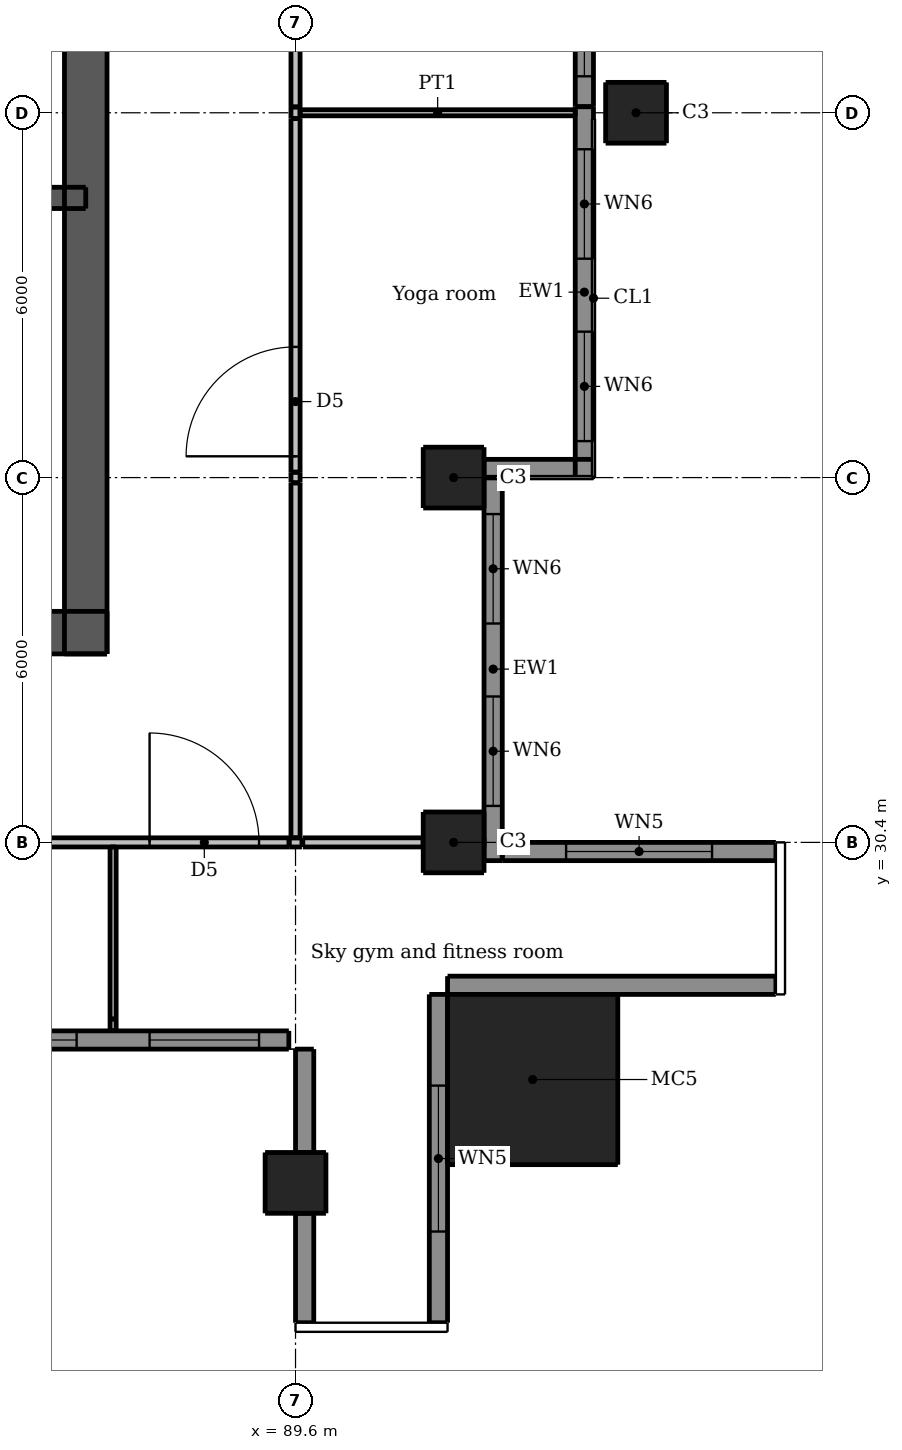
"""IFC4 building model, lengths in metres.
Left out: names, types, materials, properties, quantities, classifications, styles, units other than length and angle.
Written with IfcOpenShell. Run it as: python <this file> out.ifc"""

import sys

from ifc_helpers import new_model, si_unit, direction, frame, frame_2d, origin, origin_2d, place, context, subcontext, project, spatial, rectangle, extrude, element, fill, save


model = new_model("IFC4")
c1 = context("Model", 3, precision=1e-05, world=origin(), true_north=direction((0.0, 1.0)))
c2 = subcontext(c1, "Body", "Model", "MODEL_VIEW")
j1 = project(units=[si_unit("LENGTHUNIT", "METRE"), si_unit("PLANEANGLEUNIT", "RADIAN")], contexts=[c1])
p1 = place(None, origin())
s1 = spatial("IfcSite", under=j1, at=p1, CompositionType="ELEMENT")
p2 = place(p1, origin())
s2 = spatial("IfcBuilding", under=s1, at=p2, CompositionType="ELEMENT")
p3 = place(p2, frame((0.0, 0.0, 150.4)))
s3 = spatial("IfcBuildingStorey", under=s2, at=p3, CompositionType="ELEMENT", Elevation=150.4)
p4 = place(p3, frame((62.5, 33.85, 0.0), z_axis=(0.0, 0.0, 1.0), x_axis=(1.0, 0.0, 0.0)))
e1 = element("IfcWall", 1, at=p4, inside=s3, PredefinedType="SHEAR", context=c2, shape_type="SweptSolid", body=[
    extrude(rectangle(XDim=24.0, YDim=0.7, at=frame_2d((12.0, 0.0))), origin(), (0.0, 0.0, 1.0), 4.25),
])
p5 = place(p4, frame((1.962, 0.0, 0.0)))
e2 = element("IfcOpeningElement", 2, at=p5, cuts=e1, PredefinedType="OPENING", context=c2, shape_type="SweptSolid", body=[
    extrude(rectangle(XDim=1.1, YDim=2.1, at=frame_2d((0.55, 1.05))), frame((0.0, 0.36, 0.0), z_axis=(0.0, -1.0, 0.0), x_axis=(1.0, 0.0, 0.0)), (0.0, 0.0, 1.0), 0.72),
])
p6 = place(p4, frame((20.938, 0.0, 0.0)))
e3 = element("IfcOpeningElement", 3, at=p6, cuts=e1, PredefinedType="OPENING", context=c2, shape_type="SweptSolid", body=[
    extrude(rectangle(XDim=1.1, YDim=2.1, at=frame_2d((0.55, 1.05))), frame((0.0, 0.36, 0.0), z_axis=(0.0, -1.0, 0.0), x_axis=(1.0, 0.0, 0.0)), (0.0, 0.0, 1.0), 0.72),
])
p7 = place(p4, frame((8.0, 0.0, 0.0)))
e4 = element("IfcOpeningElement", 4, at=p7, cuts=e1, PredefinedType="OPENING", context=c2, shape_type="SweptSolid", body=[
    extrude(rectangle(XDim=1.1, YDim=2.1, at=frame_2d((0.55, 1.05))), frame((0.0, 0.36, 0.0), z_axis=(0.0, -1.0, 0.0), x_axis=(1.0, 0.0, 0.0)), (0.0, 0.0, 1.0), 0.72),
])
p8 = place(p4, frame((17.5, 0.0, 0.0)))
e5 = element("IfcOpeningElement", 5, at=p8, cuts=e1, PredefinedType="OPENING", context=c2, shape_type="SweptSolid", body=[
    extrude(rectangle(XDim=0.9, YDim=2.1, at=frame_2d((0.45, 1.05))), frame((0.0, 0.36, 0.0), z_axis=(0.0, -1.0, 0.0), x_axis=(1.0, 0.0, 0.0)), (0.0, 0.0, 1.0), 0.72),
])
p9 = place(p3, frame((86.15, 33.5, 0.0), z_axis=(0.0, 0.0, 1.0), x_axis=(0.0, 1.0, 0.0)))
e6 = element("IfcWall", 6, at=p9, inside=s3, PredefinedType="SHEAR", context=c2, shape_type="SweptSolid", body=[
    extrude(rectangle(XDim=24.0, YDim=0.7, at=frame_2d((12.0, 0.0))), origin(), (0.0, 0.0, 1.0), 4.25),
])
p10 = place(p9, frame((11.2, 0.0, 0.0)))
e7 = element("IfcOpeningElement", 7, at=p10, cuts=e6, PredefinedType="OPENING", context=c2, shape_type="SweptSolid", body=[
    extrude(rectangle(XDim=1.6, YDim=2.1, at=frame_2d((0.8, 1.05))), frame((0.0, 0.36, 0.0), z_axis=(0.0, -1.0, 0.0), x_axis=(1.0, 0.0, 0.0)), (0.0, 0.0, 1.0), 0.72),
])
p11 = place(p3, frame((62.85, 41.0, 0.0), z_axis=(0.0, 0.0, 1.0), x_axis=(1.0, 0.0, 0.0)))
e8 = element("IfcWall", 8, at=p11, inside=s3, PredefinedType="SHEAR", context=c2, shape_type="SweptSolid", body=[
    extrude(rectangle(XDim=23.3, YDim=0.35, at=frame_2d((11.65, 0.0))), origin(), (0.0, 0.0, 1.0), 4.25),
])
for number, where, z_axis, x_axis in (
    (9, (89.6, 24.8, 0.0), (0.0, 0.0, 1.0), (1.0, 0.0, 0.0)),
    (10, (92.2, 30.4, 0.0), (0.0, 0.0, 1.0), (1.0, 0.0, 0.0)),
    (11, (92.2, 36.4, 0.0), (0.0, 0.0, 1.0), (1.0, 0.0, 0.0)),
    (12, (95.2, 42.4, 0.0), (0.0, 0.0, 1.0), (1.0, 0.0, 0.0)),
):
    element("IfcColumn", number, at=place(p3, frame(where, z_axis=z_axis, x_axis=x_axis)), inside=s3, PredefinedType="COLUMN", context=c2, shape_type="SweptSolid", body=[
        extrude(rectangle(XDim=1.0, YDim=1.0, at=origin_2d()), origin(), (0.0, 0.0, 1.0), 4.25),
    ])
p12 = place(p3, frame((93.5, 26.5, 0.0), z_axis=(0.0, 0.0, 1.0), x_axis=(1.0, 0.0, 0.0)))
e13 = element("IfcColumn", 13, at=p12, inside=s3, PredefinedType="COLUMN", context=c2, shape_type="SweptSolid", body=[
    extrude(rectangle(XDim=2.8, YDim=2.8, at=origin_2d()), origin(), (0.0, 0.0, 1.0), 4.5),
])
p13 = place(p3, frame((89.75, 27.0, 0.0), z_axis=(0.0, 0.0, 1.0), x_axis=(0.0, -1.0, 0.0)))
e14 = element("IfcWall", 14, at=p13, inside=s3, PredefinedType="SOLIDWALL", context=c2, shape_type="SweptSolid", body=[
    extrude(rectangle(XDim=1.7, YDim=0.3, at=frame_2d((0.85, 0.0))), origin(), (0.0, 0.0, 1.0), 4.25),
])
p14 = place(p3, frame((89.75, 24.3, 0.0), z_axis=(0.0, 0.0, 1.0), x_axis=(0.0, -1.0, 0.0)))
e15 = element("IfcWall", 15, at=p14, inside=s3, PredefinedType="SOLIDWALL", context=c2, shape_type="SweptSolid", body=[
    extrude(rectangle(XDim=1.8, YDim=0.3, at=frame_2d((0.9, 0.0))), origin(), (0.0, 0.0, 1.0), 4.25),
])
p15 = place(p3, frame((91.95, 22.5, 0.0), z_axis=(0.0, 0.0, 1.0), x_axis=(0.0, 1.0, 0.0)))
e16 = element("IfcWall", 16, at=p15, inside=s3, PredefinedType="SOLIDWALL", context=c2, shape_type="SweptSolid", body=[
    extrude(rectangle(XDim=5.4, YDim=0.3, at=frame_2d((2.7, 0.0))), origin(), (0.0, 0.0, 1.0), 4.25),
])
p16 = place(p15, frame((1.5, 0.0, 0.15)))
e17 = element("IfcOpeningElement", 17, at=p16, cuts=e16, PredefinedType="OPENING", context=c2, shape_type="SweptSolid", body=[
    extrude(rectangle(XDim=2.4, YDim=2.1, at=frame_2d((1.2, 1.05))), frame((0.0, 0.16, 0.0), z_axis=(0.0, -1.0, 0.0), x_axis=(1.0, 0.0, 0.0)), (0.0, 0.0, 1.0), 0.32),
])
p17 = place(p3, frame((92.1, 28.05, 0.0), z_axis=(0.0, 0.0, 1.0), x_axis=(1.0, 0.0, 0.0)))
e18 = element("IfcWall", 18, at=p17, inside=s3, PredefinedType="SOLIDWALL", context=c2, shape_type="SweptSolid", body=[
    extrude(rectangle(XDim=5.4, YDim=0.3, at=frame_2d((2.7, 0.0))), origin(), (0.0, 0.0, 1.0), 4.25),
])
p18 = place(p3, frame((97.5, 30.25, 0.0), z_axis=(0.0, 0.0, 1.0), x_axis=(-1.0, 0.0, 0.0)))
e19 = element("IfcWall", 19, at=p18, inside=s3, PredefinedType="SOLIDWALL", context=c2, shape_type="SweptSolid", body=[
    extrude(rectangle(XDim=4.5, YDim=0.3, at=frame_2d((2.25, 0.0))), origin(), (0.0, 0.0, 1.0), 4.25),
])
p19 = place(p18, frame((1.05, 0.0, 0.15)))
e20 = element("IfcOpeningElement", 20, at=p19, cuts=e19, PredefinedType="OPENING", context=c2, shape_type="SweptSolid", body=[
    extrude(rectangle(XDim=2.4, YDim=2.1, at=frame_2d((1.2, 1.05))), frame((0.0, 0.16, 0.0), z_axis=(0.0, -1.0, 0.0), x_axis=(1.0, 0.0, 0.0)), (0.0, 0.0, 1.0), 0.32),
])
p20 = place(p3, frame((83.7, 27.15, 0.0), z_axis=(0.0, 0.0, 1.0), x_axis=(1.0, 0.0, 0.0)))
e21 = element("IfcWall", 21, at=p20, inside=s3, PredefinedType="SOLIDWALL", context=c2, shape_type="SweptSolid", body=[
    extrude(rectangle(XDim=5.79, YDim=0.3, at=frame_2d((2.895, 0.0))), origin(), (0.0, 0.0, 1.0), 4.25),
])
p21 = place(p20, frame((0.5, 0.0, 0.15)))
e22 = element("IfcOpeningElement", 22, at=p21, cuts=e21, PredefinedType="OPENING", context=c2, shape_type="SweptSolid", body=[
    extrude(rectangle(XDim=1.8, YDim=2.1, at=frame_2d((0.9, 1.05))), frame((0.0, 0.16, 0.0), z_axis=(0.0, -1.0, 0.0), x_axis=(1.0, 0.0, 0.0)), (0.0, 0.0, 1.0), 0.32),
])
p22 = place(p20, frame((3.5, 0.0, 0.15)))
e23 = element("IfcOpeningElement", 23, at=p22, cuts=e21, PredefinedType="OPENING", context=c2, shape_type="SweptSolid", body=[
    extrude(rectangle(XDim=1.8, YDim=2.1, at=frame_2d((0.9, 1.05))), frame((0.0, 0.16, 0.0), z_axis=(0.0, -1.0, 0.0), x_axis=(1.0, 0.0, 0.0)), (0.0, 0.0, 1.0), 0.32),
])
p23 = place(p3, frame((92.85, 30.1, 0.0), z_axis=(0.0, 0.0, 1.0), x_axis=(0.0, 1.0, 0.0)))
e24 = element("IfcWall", 24, at=p23, inside=s3, PredefinedType="SOLIDWALL", context=c2, shape_type="SweptSolid", body=[
    extrude(rectangle(XDim=6.3, YDim=0.3, at=frame_2d((3.15, 0.0))), origin(), (0.0, 0.0, 1.0), 4.25),
])
p24 = place(p23, frame((0.9, 0.0, 0.15)))
e25 = element("IfcOpeningElement", 25, at=p24, cuts=e24, PredefinedType="OPENING", context=c2, shape_type="SweptSolid", body=[
    extrude(rectangle(XDim=1.8, YDim=2.1, at=frame_2d((0.9, 1.05))), frame((0.0, 0.16, 0.0), z_axis=(0.0, -1.0, 0.0), x_axis=(1.0, 0.0, 0.0)), (0.0, 0.0, 1.0), 0.32),
])
p25 = place(p23, frame((3.9, 0.0, 0.15)))
e26 = element("IfcOpeningElement", 26, at=p25, cuts=e24, PredefinedType="OPENING", context=c2, shape_type="SweptSolid", body=[
    extrude(rectangle(XDim=1.8, YDim=2.1, at=frame_2d((0.9, 1.05))), frame((0.0, 0.16, 0.0), z_axis=(0.0, -1.0, 0.0), x_axis=(1.0, 0.0, 0.0)), (0.0, 0.0, 1.0), 0.32),
])
p26 = place(p3, frame((92.7, 36.55, 0.0), z_axis=(0.0, 0.0, 1.0), x_axis=(1.0, 0.0, 0.0)))
e27 = element("IfcWall", 27, at=p26, inside=s3, PredefinedType="SOLIDWALL", context=c2, shape_type="SweptSolid", body=[
    extrude(rectangle(XDim=1.8, YDim=0.3, at=frame_2d((0.9, 0.0))), origin(), (0.0, 0.0, 1.0), 3.795),
])
p27 = place(p3, frame((94.35, 36.4, 0.0), z_axis=(0.0, 0.0, 1.0), x_axis=(0.0, 1.0, 0.0)))
e28 = element("IfcWall", 28, at=p27, inside=s3, PredefinedType="SOLIDWALL", context=c2, shape_type="SweptSolid", body=[
    extrude(rectangle(XDim=6.1, YDim=0.3, at=frame_2d((3.05, 0.0))), origin(), (0.0, 0.0, 1.0), 4.25),
])
p28 = place(p27, frame((0.6, 0.0, 0.15)))
e29 = element("IfcOpeningElement", 29, at=p28, cuts=e28, PredefinedType="OPENING", context=c2, shape_type="SweptSolid", body=[
    extrude(rectangle(XDim=1.8, YDim=2.1, at=frame_2d((0.9, 1.05))), frame((0.0, 0.16, 0.0), z_axis=(0.0, -1.0, 0.0), x_axis=(1.0, 0.0, 0.0)), (0.0, 0.0, 1.0), 0.32),
])
p29 = place(p27, frame((3.6, 0.0, 0.15)))
e30 = element("IfcOpeningElement", 30, at=p29, cuts=e28, PredefinedType="OPENING", context=c2, shape_type="SweptSolid", body=[
    extrude(rectangle(XDim=1.8, YDim=2.1, at=frame_2d((0.9, 1.05))), frame((0.0, 0.16, 0.0), z_axis=(0.0, -1.0, 0.0), x_axis=(1.0, 0.0, 0.0)), (0.0, 0.0, 1.0), 0.32),
])
p30 = place(p3, frame((94.35, 42.5, 0.0), z_axis=(0.0, 0.0, 1.0), x_axis=(0.0, 1.0, 0.0)))
e31 = element("IfcWall", 31, at=p30, inside=s3, PredefinedType="SOLIDWALL", context=c2, shape_type="SweptSolid", body=[
    extrude(rectangle(XDim=5.8, YDim=0.3, at=frame_2d((2.9, 0.0))), origin(), (0.0, 0.0, 1.0), 4.25),
])
p31 = place(p30, frame((0.5, 0.0, 0.15)))
e32 = element("IfcOpeningElement", 32, at=p31, cuts=e31, PredefinedType="OPENING", context=c2, shape_type="SweptSolid", body=[
    extrude(rectangle(XDim=1.8, YDim=2.1, at=frame_2d((0.9, 1.05))), frame((0.0, 0.16, 0.0), z_axis=(0.0, -1.0, 0.0), x_axis=(1.0, 0.0, 0.0)), (0.0, 0.0, 1.0), 0.32),
])
p32 = place(p30, frame((3.5, 0.0, 0.15)))
e33 = element("IfcOpeningElement", 33, at=p32, cuts=e31, PredefinedType="OPENING", context=c2, shape_type="SweptSolid", body=[
    extrude(rectangle(XDim=1.8, YDim=2.1, at=frame_2d((0.9, 1.05))), frame((0.0, 0.16, 0.0), z_axis=(0.0, -1.0, 0.0), x_axis=(1.0, 0.0, 0.0)), (0.0, 0.0, 1.0), 0.32),
])
p33 = place(p3, frame((83.696, 30.4, 0.0), z_axis=(0.0, 0.0, 1.0), x_axis=(1.0, 0.0, 0.0)))
e34 = element("IfcWall", 34, at=p33, inside=s3, PredefinedType="PARTITIONING", context=c2, shape_type="SweptSolid", body=[
    extrude(rectangle(XDim=5.799, YDim=0.15, at=frame_2d((2.899, 0.0))), origin(), (0.0, 0.0, 1.0), 4.25),
])
p34 = place(p33, frame((3.504, 0.0, 0.0)))
e35 = element("IfcOpeningElement", 35, at=p34, cuts=e34, PredefinedType="OPENING", context=c2, shape_type="SweptSolid", body=[
    extrude(rectangle(XDim=1.8, YDim=2.1, at=frame_2d((0.9, 1.05))), frame((0.0, 0.085, 0.0), z_axis=(0.0, -1.0, 0.0), x_axis=(1.0, 0.0, 0.0)), (0.0, 0.0, 1.0), 0.17),
])
p35 = place(p3, frame((89.495, 30.4, 0.0), z_axis=(0.0, 0.0, 1.0), x_axis=(1.0, 0.0, 0.0)))
e36 = element("IfcWall", 36, at=p35, inside=s3, PredefinedType="PARTITIONING", context=c2, shape_type="SweptSolid", body=[
    extrude(rectangle(XDim=0.211, YDim=0.15, at=frame_2d((0.105, 0.0))), origin(), (0.0, 0.0, 1.0), 3.711),
])
p36 = place(p3, frame((89.72, 30.4, 0.0), z_axis=(0.0, 0.0, 1.0), x_axis=(1.0, 0.0, 0.0)))
e37 = element("IfcWall", 37, at=p36, inside=s3, PredefinedType="PARTITIONING", context=c2, shape_type="SweptSolid", body=[
    extrude(rectangle(XDim=1.98, YDim=0.15, at=frame_2d((0.99, 0.0))), origin(), (0.0, 0.0, 1.0), 3.899),
])
p37 = place(p3, frame((91.7, 30.4, 0.0), z_axis=(0.0, 0.0, 1.0), x_axis=(1.0, 0.0, 0.0)))
e38 = element("IfcWall", 38, at=p37, inside=s3, PredefinedType="PARTITIONING", context=c2, shape_type="SweptSolid", body=[
    extrude(rectangle(XDim=1.0, YDim=0.15, at=frame_2d((0.5, 0.0))), origin(), (0.0, 0.0, 1.0), 4.25),
])
p38 = place(p3, frame((89.675, 42.4, 0.0), z_axis=(0.0, 0.0, 1.0), x_axis=(1.0, 0.0, 0.0)))
e39 = element("IfcWall", 39, at=p38, inside=s3, PredefinedType="PARTITIONING", context=c2, shape_type="SweptSolid", body=[
    extrude(rectangle(XDim=4.525, YDim=0.1, at=frame_2d((2.262, 0.0))), origin(), (0.0, 0.0, 1.0), 3.79),
])
p39 = place(p3, frame((86.6, 27.305, 0.0), z_axis=(0.0, 0.0, 1.0), x_axis=(0.0, 1.0, 0.0)))
e40 = element("IfcWall", 40, at=p39, inside=s3, PredefinedType="PARTITIONING", context=c2, shape_type="SweptSolid", body=[
    extrude(rectangle(XDim=0.19, YDim=0.1, at=frame_2d((0.095, 0.0))), origin(), (0.0, 0.0, 1.0), 3.797),
])
p40 = place(p3, frame((86.6, 27.495, 0.0), z_axis=(0.0, 0.0, 1.0), x_axis=(0.0, 1.0, 0.0)))
e41 = element("IfcWall", 41, at=p40, inside=s3, PredefinedType="PARTITIONING", context=c2, shape_type="SweptSolid", body=[
    extrude(rectangle(XDim=2.83, YDim=0.1, at=frame_2d((1.415, 0.0))), origin(), (0.0, 0.0, 1.0), 4.25),
])
p41 = place(p3, frame((89.6, 30.475, 0.0), z_axis=(0.0, 0.0, 1.0), x_axis=(0.0, 1.0, 0.0)))
e42 = element("IfcWall", 42, at=p41, inside=s3, PredefinedType="PARTITIONING", context=c2, shape_type="SweptSolid", body=[
    extrude(rectangle(XDim=5.836, YDim=0.15, at=frame_2d((2.918, 0.0))), origin(), (0.0, 0.0, 1.0), 3.711),
])
p42 = place(p3, frame((89.6, 36.316, 0.0), z_axis=(0.0, 0.0, 1.0), x_axis=(0.0, 1.0, 0.0)))
e43 = element("IfcWall", 43, at=p42, inside=s3, PredefinedType="PARTITIONING", context=c2, shape_type="SweptSolid", body=[
    extrude(rectangle(XDim=0.173, YDim=0.15, at=frame_2d((0.086, 0.0))), origin(), (0.0, 0.0, 1.0), 3.847),
])
p43 = place(p3, frame((89.6, 36.489, 0.0), z_axis=(0.0, 0.0, 1.0), x_axis=(0.0, 1.0, 0.0)))
e44 = element("IfcWall", 44, at=p43, inside=s3, PredefinedType="PARTITIONING", context=c2, shape_type="SweptSolid", body=[
    extrude(rectangle(XDim=5.815, YDim=0.15, at=frame_2d((2.908, 0.0))), origin(), (0.0, 0.0, 1.0), 4.25),
])
p44 = place(p43, frame((0.261, 0.0, 0.0)))
e45 = element("IfcOpeningElement", 45, at=p44, cuts=e44, PredefinedType="OPENING", context=c2, shape_type="SweptSolid", body=[
    extrude(rectangle(XDim=1.8, YDim=2.1, at=frame_2d((0.9, 1.05))), frame((0.0, 0.085, 0.0), z_axis=(0.0, -1.0, 0.0), x_axis=(1.0, 0.0, 0.0)), (0.0, 0.0, 1.0), 0.17),
])
p45 = place(p3, frame((89.6, 42.304, 0.0), z_axis=(0.0, 0.0, 1.0), x_axis=(0.0, 1.0, 0.0)))
e46 = element("IfcWall", 46, at=p45, inside=s3, PredefinedType="PARTITIONING", context=c2, shape_type="SweptSolid", body=[
    extrude(rectangle(XDim=0.191, YDim=0.15, at=frame_2d((0.096, 0.0))), origin(), (0.0, 0.0, 1.0), 3.79),
])
p46 = place(p3, frame((89.6, 42.496, 0.0), z_axis=(0.0, 0.0, 1.0), x_axis=(0.0, 1.0, 0.0)))
e47 = element("IfcWall", 47, at=p46, inside=s3, PredefinedType="PARTITIONING", context=c2, shape_type="SweptSolid", body=[
    extrude(rectangle(XDim=5.809, YDim=0.15, at=frame_2d((2.904, 0.0))), origin(), (0.0, 0.0, 1.0), 4.25),
])
p47 = place(p16, origin())
e48 = element("IfcWindow", 48, at=p47, inside=s3, PartitioningType="DOUBLE_PANEL_VERTICAL", PredefinedType="WINDOW", context=c2, shape_type="SweptSolid", body=[
    extrude(rectangle(XDim=2.4, YDim=2.1, at=frame_2d((1.2, 1.05))), frame((0.0, 0.03, 0.0), z_axis=(0.0, -1.0, 0.0), x_axis=(1.0, 0.0, 0.0)), (0.0, 0.0, 1.0), 0.06),
])
fill(e17, e48)
p48 = place(p19, origin())
e49 = element("IfcWindow", 49, at=p48, inside=s3, PartitioningType="DOUBLE_PANEL_VERTICAL", PredefinedType="WINDOW", context=c2, shape_type="SweptSolid", body=[
    extrude(rectangle(XDim=2.4, YDim=2.1, at=frame_2d((1.2, 1.05))), frame((0.0, 0.03, 0.0), z_axis=(0.0, -1.0, 0.0), x_axis=(1.0, 0.0, 0.0)), (0.0, 0.0, 1.0), 0.06),
])
fill(e20, e49)
p49 = place(p21, origin())
e50 = element("IfcWindow", 50, at=p49, inside=s3, PartitioningType="DOUBLE_PANEL_VERTICAL", PredefinedType="WINDOW", context=c2, shape_type="SweptSolid", body=[
    extrude(rectangle(XDim=1.8, YDim=2.1, at=frame_2d((0.9, 1.05))), frame((0.0, 0.03, 0.0), z_axis=(0.0, -1.0, 0.0), x_axis=(1.0, 0.0, 0.0)), (0.0, 0.0, 1.0), 0.06),
])
fill(e22, e50)
p50 = place(p22, origin())
e51 = element("IfcWindow", 51, at=p50, inside=s3, PartitioningType="DOUBLE_PANEL_VERTICAL", PredefinedType="WINDOW", context=c2, shape_type="SweptSolid", body=[
    extrude(rectangle(XDim=1.8, YDim=2.1, at=frame_2d((0.9, 1.05))), frame((0.0, 0.03, 0.0), z_axis=(0.0, -1.0, 0.0), x_axis=(1.0, 0.0, 0.0)), (0.0, 0.0, 1.0), 0.06),
])
fill(e23, e51)
p51 = place(p24, origin())
e52 = element("IfcWindow", 52, at=p51, inside=s3, PartitioningType="DOUBLE_PANEL_VERTICAL", PredefinedType="WINDOW", context=c2, shape_type="SweptSolid", body=[
    extrude(rectangle(XDim=1.8, YDim=2.1, at=frame_2d((0.9, 1.05))), frame((0.0, 0.03, 0.0), z_axis=(0.0, -1.0, 0.0), x_axis=(1.0, 0.0, 0.0)), (0.0, 0.0, 1.0), 0.06),
])
fill(e25, e52)
p52 = place(p25, origin())
e53 = element("IfcWindow", 53, at=p52, inside=s3, PartitioningType="DOUBLE_PANEL_VERTICAL", PredefinedType="WINDOW", context=c2, shape_type="SweptSolid", body=[
    extrude(rectangle(XDim=1.8, YDim=2.1, at=frame_2d((0.9, 1.05))), frame((0.0, 0.03, 0.0), z_axis=(0.0, -1.0, 0.0), x_axis=(1.0, 0.0, 0.0)), (0.0, 0.0, 1.0), 0.06),
])
fill(e26, e53)
p53 = place(p28, origin())
e54 = element("IfcWindow", 54, at=p53, inside=s3, PartitioningType="DOUBLE_PANEL_VERTICAL", PredefinedType="WINDOW", context=c2, shape_type="SweptSolid", body=[
    extrude(rectangle(XDim=1.8, YDim=2.1, at=frame_2d((0.9, 1.05))), frame((0.0, 0.03, 0.0), z_axis=(0.0, -1.0, 0.0), x_axis=(1.0, 0.0, 0.0)), (0.0, 0.0, 1.0), 0.06),
])
fill(e29, e54)
p54 = place(p29, origin())
e55 = element("IfcWindow", 55, at=p54, inside=s3, PartitioningType="DOUBLE_PANEL_VERTICAL", PredefinedType="WINDOW", context=c2, shape_type="SweptSolid", body=[
    extrude(rectangle(XDim=1.8, YDim=2.1, at=frame_2d((0.9, 1.05))), frame((0.0, 0.03, 0.0), z_axis=(0.0, -1.0, 0.0), x_axis=(1.0, 0.0, 0.0)), (0.0, 0.0, 1.0), 0.06),
])
fill(e30, e55)
p55 = place(p31, origin())
e56 = element("IfcWindow", 56, at=p55, inside=s3, PartitioningType="DOUBLE_PANEL_VERTICAL", PredefinedType="WINDOW", context=c2, shape_type="SweptSolid", body=[
    extrude(rectangle(XDim=1.8, YDim=2.1, at=frame_2d((0.9, 1.05))), frame((0.0, 0.03, 0.0), z_axis=(0.0, -1.0, 0.0), x_axis=(1.0, 0.0, 0.0)), (0.0, 0.0, 1.0), 0.06),
])
fill(e32, e56)
p56 = place(p34, origin())
e57 = element("IfcDoor", 57, at=p56, inside=s3, OperationType="DOUBLE_DOOR_SINGLE_SWING", PredefinedType="DOOR", context=c2, shape_type="SweptSolid", body=[
    extrude(rectangle(XDim=1.8, YDim=2.1, at=frame_2d((0.9, 1.05))), frame((0.0, 0.025, 0.0), z_axis=(0.0, -1.0, 0.0), x_axis=(1.0, 0.0, 0.0)), (0.0, 0.0, 1.0), 0.05),
])
fill(e35, e57)
p57 = place(p44, origin())
e58 = element("IfcDoor", 58, at=p57, inside=s3, OperationType="DOUBLE_DOOR_SINGLE_SWING", PredefinedType="DOOR", context=c2, shape_type="SweptSolid", body=[
    extrude(rectangle(XDim=1.8, YDim=2.1, at=frame_2d((0.9, 1.05))), frame((0.0, 0.025, 0.0), z_axis=(0.0, -1.0, 0.0), x_axis=(1.0, 0.0, 0.0)), (0.0, 0.0, 1.0), 0.05),
])
fill(e45, e58)
save(model, sys.argv[1])
